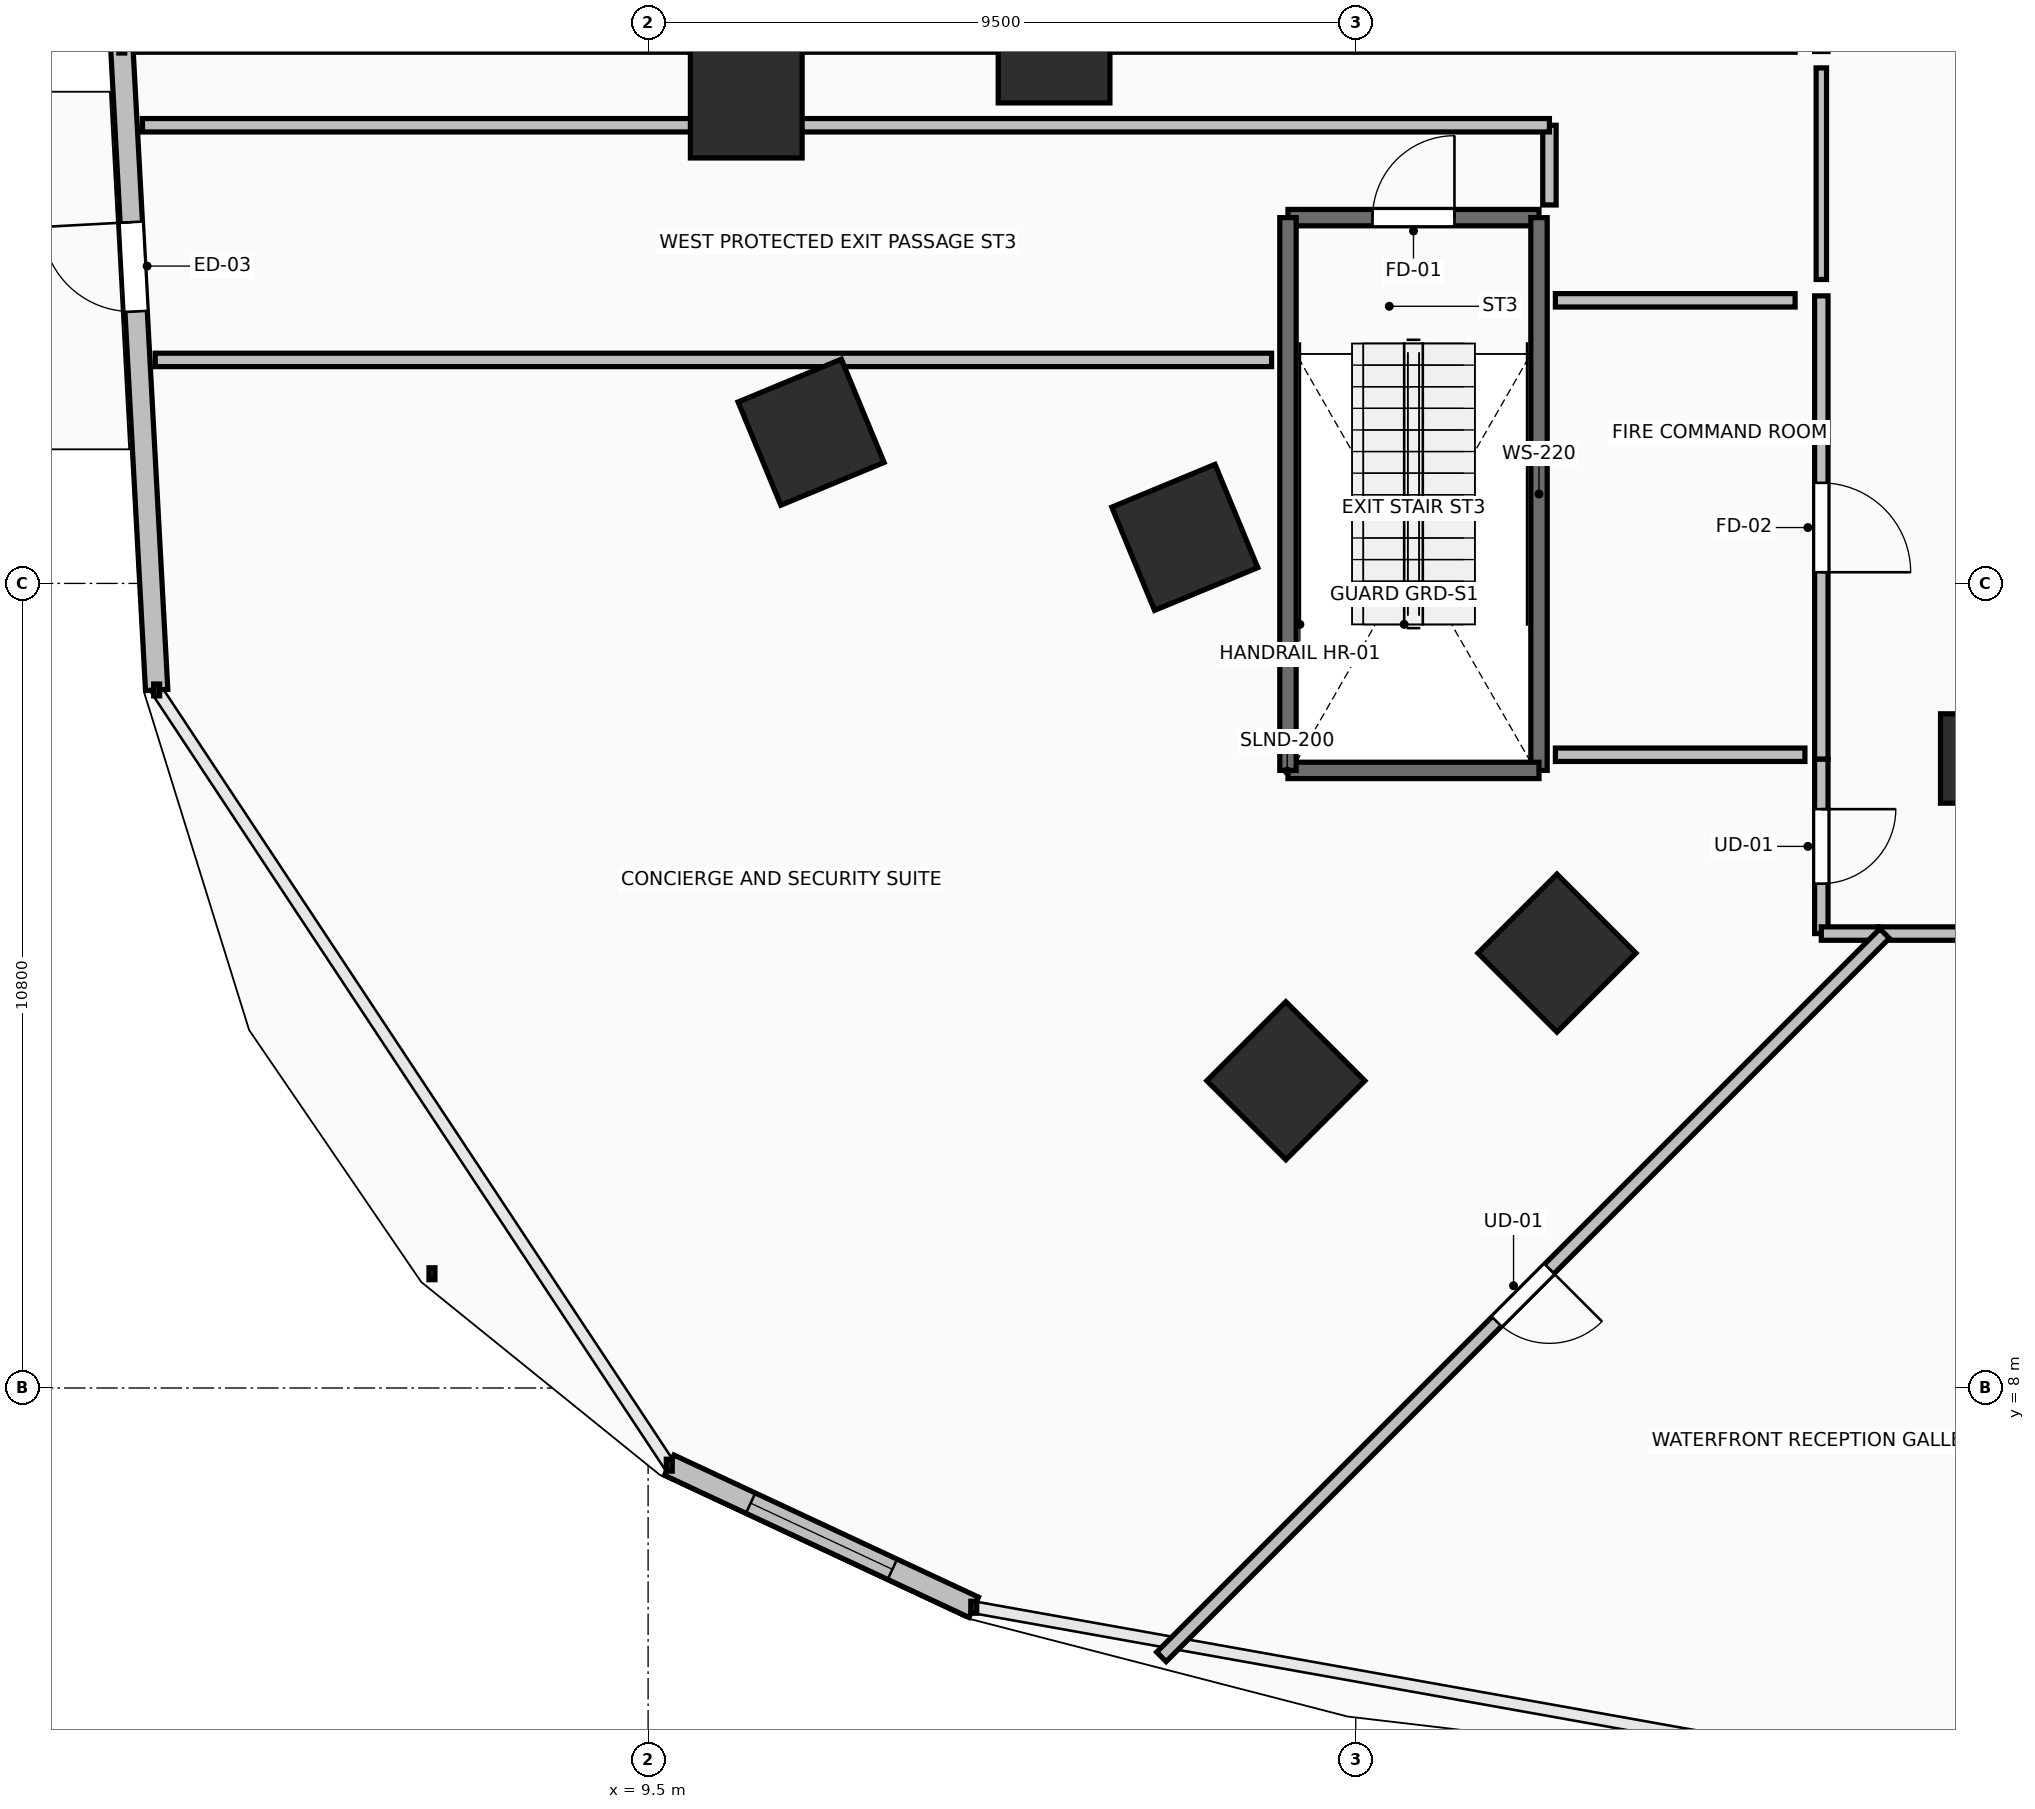
"""IFC4 building model, lengths in metres.
Left out: names, types, materials, properties, quantities, classifications, styles, units other than length and angle.
Written with IfcOpenShell. Run it as: python <this file> out.ifc"""

import sys

from ifc_helpers import new_model, si_unit, direction, frame, frame_2d, origin, origin_2d, place, context, subcontext, project, spatial, rectangle, extrude, element, fill, save


model = new_model("IFC4")
c1 = context("Model", 3, precision=1e-05, world=origin(), true_north=direction((0.0, 1.0)))
c2 = subcontext(c1, "Body", "Model", "MODEL_VIEW")
j1 = project(units=[si_unit("LENGTHUNIT", "METRE"), si_unit("PLANEANGLEUNIT", "RADIAN")], contexts=[c1])
p1 = place(None, origin())
s1 = spatial("IfcSite", under=j1, at=p1, CompositionType="ELEMENT")
p2 = place(p1, origin())
s2 = spatial("IfcBuilding", under=s1, at=p2, CompositionType="ELEMENT")
p3 = place(p2, origin())
s3 = spatial("IfcBuildingStorey", under=s2, at=p3, CompositionType="ELEMENT", Elevation=0.0)
for number, where, z_axis, x_axis in (
    (1, (14.95, 26.0, 0.0), (0.0, 0.0, 1.0), (-1.0, 0.0, 0.0)),
    (2, (16.705, 19.418, 0.0), (0.0, 0.0, 1.0), (-0.924, -0.383, 0.0)),
    (3, (21.701, 13.838, 0.0), (0.0, 0.0, 1.0), (-0.707, -0.707, 0.0)),
    (4, (10.818, 25.261, 0.0), (0.0, 0.0, 1.0), (-1.0, 0.0, 0.0)),
    (5, (11.688, 20.83, 0.0), (0.0, 0.0, 1.0), (-0.924, -0.383, 0.0)),
    (6, (18.061, 12.124, 0.0), (0.0, 0.0, 1.0), (-0.707, -0.707, 0.0)),
):
    element("IfcColumn", number, at=place(p3, frame(where, z_axis=z_axis, x_axis=x_axis)), inside=s3, PredefinedType="COLUMN", context=c2, shape_type="SweptSolid", body=[
        extrude(rectangle(XDim=1.5, YDim=1.5, at=origin_2d()), origin(), (0.0, 0.0, 1.0), 4.8),
    ])
p4 = place(p3, frame((27.25, 16.45, 0.0), z_axis=(0.0, 0.0, 1.0), x_axis=(1.0, 0.0, 0.0)))
e7 = element("IfcColumn", 7, at=p4, inside=s3, PredefinedType="PILASTER", context=c2, shape_type="SweptSolid", body=[
    extrude(rectangle(XDim=0.8, YDim=1.2, at=origin_2d()), origin(), (0.0, 0.0, 1.0), 4.8),
])
p5 = place(p3, frame((2.434, 26.0, 0.0), z_axis=(0.0, 0.0, 1.0), x_axis=(0.054179266439, -0.998531224894, 0.0)))
e8 = element("IfcWall", 8, at=p5, inside=s3, PredefinedType="STANDARD", context=c2, shape_type="SweptSolid", body=[
    extrude(rectangle(XDim=8.643, YDim=0.3, at=frame_2d((4.321, 0.0))), origin(), (0.0, 0.0, 1.0), 4.48),
])
p6 = place(p5, frame((2.354, 0.0, 0.0)))
e9 = element("IfcOpeningElement", 9, at=p6, cuts=e8, PredefinedType="OPENING", context=c2, shape_type="SweptSolid", body=[
    extrude(rectangle(XDim=1.2, YDim=2.15, at=frame_2d((0.6, 1.075))), frame((0.0, 0.165, 0.0), z_axis=(0.0, -1.0, 0.0), x_axis=(1.0, 0.0, 0.0)), (0.0, 0.0, 1.0), 0.33),
])
p7 = place(p3, frame((9.784, 6.964, 0.0), z_axis=(0.0, 0.0, 1.0), x_axis=(0.90617069541, -0.422912131275, 0.0)))
e10 = element("IfcWall", 10, at=p7, inside=s3, PredefinedType="STANDARD", context=c2, shape_type="SweptSolid", body=[
    extrude(rectangle(XDim=4.511, YDim=0.3, at=frame_2d((2.255, 0.0))), origin(), (0.0, 0.0, 1.0), 4.48),
])
p8 = place(p7, frame((1.205, 0.0, 0.9)))
e11 = element("IfcOpeningElement", 11, at=p8, cuts=e10, PredefinedType="OPENING", context=c2, shape_type="SweptSolid", body=[
    extrude(rectangle(XDim=2.1, YDim=2.4, at=frame_2d((1.05, 1.2))), frame((0.0, 0.165, 0.0), z_axis=(0.0, -1.0, 0.0), x_axis=(1.0, 0.0, 0.0)), (0.0, 0.0, 1.0), 0.33),
])
p9 = place(p3, frame((18.09, 23.71, 0.0), z_axis=(0.0, 0.0, 1.0), x_axis=(1.0, 0.0, 0.0)))
e12 = element("IfcWall", 12, at=p9, inside=s3, PredefinedType="SOLIDWALL", context=c2, shape_type="SweptSolid", body=[
    extrude(rectangle(XDim=3.37, YDim=0.22, at=frame_2d((1.685, 0.0))), origin(), (0.0, 0.0, 1.0), 4.48),
])
p10 = place(p9, frame((1.135, 0.0, 0.0)))
e13 = element("IfcOpeningElement", 13, at=p10, cuts=e12, PredefinedType="OPENING", context=c2, shape_type="SweptSolid", body=[
    extrude(rectangle(XDim=1.1, YDim=2.15, at=frame_2d((0.55, 1.075))), frame((0.0, 0.125, 0.0), z_axis=(0.0, -1.0, 0.0), x_axis=(1.0, 0.0, 0.0)), (0.0, 0.0, 1.0), 0.25),
])
p11 = place(p3, frame((21.46, 23.71, 0.0), z_axis=(0.0, 0.0, 1.0), x_axis=(0.0, -1.0, 0.0)))
e14 = element("IfcWall", 14, at=p11, inside=s3, PredefinedType="SOLIDWALL", context=c2, shape_type="SweptSolid", body=[
    extrude(rectangle(XDim=7.42, YDim=0.22, at=frame_2d((3.71, 0.0))), origin(), (0.0, 0.0, 1.0), 4.48),
])
p12 = place(p3, frame((21.46, 16.29, 0.0), z_axis=(0.0, 0.0, 1.0), x_axis=(-1.0, 0.0, 0.0)))
e15 = element("IfcWall", 15, at=p12, inside=s3, PredefinedType="SOLIDWALL", context=c2, shape_type="SweptSolid", body=[
    extrude(rectangle(XDim=3.37, YDim=0.22, at=frame_2d((1.685, 0.0))), origin(), (0.0, 0.0, 1.0), 4.48),
])
p13 = place(p3, frame((18.09, 16.29, 0.0), z_axis=(0.0, 0.0, 1.0), x_axis=(0.0, 1.0, 0.0)))
e16 = element("IfcWall", 16, at=p13, inside=s3, PredefinedType="SOLIDWALL", context=c2, shape_type="SweptSolid", body=[
    extrude(rectangle(XDim=7.42, YDim=0.22, at=frame_2d((3.71, 0.0))), origin(), (0.0, 0.0, 1.0), 4.48),
])
p14 = place(p3, frame((25.25, 22.66, 0.0), z_axis=(0.0, 0.0, 1.0), x_axis=(0.0, -1.0, 0.0)))
e17 = element("IfcWall", 17, at=p14, inside=s3, PredefinedType="PARTITIONING", context=c2, shape_type="SweptSolid", body=[
    extrude(rectangle(XDim=6.22, YDim=0.18, at=frame_2d((3.11, 0.0))), origin(), (0.0, 0.0, 1.0), 4.48),
])
p15 = place(p14, frame((2.51, 0.0, 0.0)))
e18 = element("IfcOpeningElement", 18, at=p15, cuts=e17, PredefinedType="OPENING", context=c2, shape_type="SweptSolid", body=[
    extrude(rectangle(XDim=1.2, YDim=2.15, at=frame_2d((0.6, 1.075))), frame((0.0, 0.105, 0.0), z_axis=(0.0, -1.0, 0.0), x_axis=(1.0, 0.0, 0.0)), (0.0, 0.0, 1.0), 0.21),
])
p16 = place(p3, frame((26.015, 14.1, 0.0), z_axis=(0.0, 0.0, 1.0), x_axis=(1.0, 0.0, 0.0)))
e19 = element("IfcWall", 19, at=p16, inside=s3, PredefinedType="PARTITIONING", context=c2, shape_type="SweptSolid", body=[
    extrude(rectangle(XDim=7.116, YDim=0.18, at=frame_2d((3.558, 0.0))), origin(), (0.0, 0.0, 1.0), 3.672),
])
p17 = place(p16, frame((2.958, 0.0, 0.0)))
e20 = element("IfcOpeningElement", 20, at=p17, cuts=e19, PredefinedType="OPENING", context=c2, shape_type="SweptSolid", body=[
    extrude(rectangle(XDim=1.2, YDim=2.15, at=frame_2d((0.6, 1.075))), frame((0.0, 0.105, 0.0), z_axis=(0.0, -1.0, 0.0), x_axis=(1.0, 0.0, 0.0)), (0.0, 0.0, 1.0), 0.21),
])
p18 = place(p3, frame((25.25, 16.44, 0.0), z_axis=(0.0, 0.0, 1.0), x_axis=(0.0, -1.0, 0.0)))
e21 = element("IfcWall", 21, at=p18, inside=s3, PredefinedType="PARTITIONING", context=c2, shape_type="SweptSolid", body=[
    extrude(rectangle(XDim=2.34, YDim=0.18, at=frame_2d((1.17, 0.0))), origin(), (0.0, 0.0, 1.0), 3.672),
])
p19 = place(p18, frame((0.67, 0.0, 0.0)))
e22 = element("IfcOpeningElement", 22, at=p19, cuts=e21, PredefinedType="OPENING", context=c2, shape_type="SweptSolid", body=[
    extrude(rectangle(XDim=1.0, YDim=2.15, at=frame_2d((0.5, 1.075))), frame((0.0, 0.105, 0.0), z_axis=(0.0, -1.0, 0.0), x_axis=(1.0, 0.0, 0.0)), (0.0, 0.0, 1.0), 0.21),
])
p20 = place(p3, frame((25.25, 14.1, 0.0), z_axis=(0.0, 0.0, 1.0), x_axis=(1.0, 0.0, 0.0)))
e23 = element("IfcWall", 23, at=p20, inside=s3, PredefinedType="PARTITIONING", context=c2, shape_type="SweptSolid", body=[
    extrude(rectangle(XDim=0.765, YDim=0.18, at=frame_2d((0.382, 0.0))), origin(), (0.0, 0.0, 1.0), 4.212),
])
p21 = place(p3, frame((26.1, 14.1, 0.0), z_axis=(0.0, 0.0, 1.0), x_axis=(-0.707106781187, -0.707106781187, 0.0)))
e24 = element("IfcWall", 24, at=p21, inside=s3, PredefinedType="PARTITIONING", context=c2, shape_type="SweptSolid", body=[
    extrude(rectangle(XDim=13.73, YDim=0.18, at=frame_2d((6.865, 0.0))), origin(), (0.0, 0.0, 1.0), 3.769),
])
p22 = place(p21, frame((6.365, 0.0, 0.0)))
e25 = element("IfcOpeningElement", 25, at=p22, cuts=e24, PredefinedType="OPENING", context=c2, shape_type="SweptSolid", body=[
    extrude(rectangle(XDim=1.0, YDim=2.15, at=frame_2d((0.5, 1.075))), frame((0.0, 0.105, 0.0), z_axis=(0.0, -1.0, 0.0), x_axis=(1.0, 0.0, 0.0)), (0.0, 0.0, 1.0), 0.21),
])
p23 = place(p3, frame((25.25, 25.72, 0.0), z_axis=(0.0, 0.0, 1.0), x_axis=(0.0, -1.0, 0.0)))
e26 = element("IfcWall", 26, at=p23, inside=s3, PredefinedType="PARTITIONING", context=c2, shape_type="SweptSolid", body=[
    extrude(rectangle(XDim=2.84, YDim=0.14, at=frame_2d((1.42, 0.0))), origin(), (0.0, 0.0, 1.0), 4.48),
])
p24 = place(p3, frame((21.6, 23.88, 0.0), z_axis=(0.0, 0.0, 1.0), x_axis=(0.0, 1.0, 0.0)))
e27 = element("IfcWall", 27, at=p24, inside=s3, PredefinedType="PARTITIONING", context=c2, shape_type="SweptSolid", body=[
    extrude(rectangle(XDim=1.07, YDim=0.18, at=frame_2d((0.535, 0.0))), origin(), (0.0, 0.0, 1.0), 4.48),
])
p25 = place(p3, frame((21.6, 24.95, 0.0), z_axis=(0.0, 0.0, 1.0), x_axis=(-1.0, 0.0, 0.0)))
e28 = element("IfcWall", 28, at=p25, inside=s3, PredefinedType="PARTITIONING", context=c2, shape_type="SweptSolid", body=[
    extrude(rectangle(XDim=18.888, YDim=0.18, at=frame_2d((9.444, 0.0))), origin(), (0.0, 0.0, 1.0), 4.162),
])
p26 = place(p3, frame((2.883, 21.8, 0.0), z_axis=(0.0, 0.0, 1.0), x_axis=(1.0, 0.0, 0.0)))
e29 = element("IfcWall", 29, at=p26, inside=s3, PredefinedType="PARTITIONING", context=c2, shape_type="SweptSolid", body=[
    extrude(rectangle(XDim=14.987, YDim=0.18, at=frame_2d((7.494, 0.0))), origin(), (0.0, 0.0, 1.0), 3.769),
])
p27 = place(p3, frame((21.68, 16.5, 0.0), z_axis=(0.0, 0.0, 1.0), x_axis=(1.0, 0.0, 0.0)))
e30 = element("IfcWall", 30, at=p27, inside=s3, PredefinedType="PARTITIONING", context=c2, shape_type="SweptSolid", body=[
    extrude(rectangle(XDim=3.35, YDim=0.18, at=frame_2d((1.675, 0.0))), origin(), (0.0, 0.0, 1.0), 4.48),
])
p28 = place(p3, frame((24.898, 22.6, 0.0), z_axis=(0.0, 0.0, 1.0), x_axis=(-1.0, 0.0, 0.0)))
e31 = element("IfcWall", 31, at=p28, inside=s3, PredefinedType="PARTITIONING", context=c2, shape_type="SweptSolid", body=[
    extrude(rectangle(XDim=3.218, YDim=0.18, at=frame_2d((1.609, 0.0))), origin(), (0.0, 0.0, 1.0), 4.48),
])
p29 = place(p6, frame((1.2, 0.0, 0.0), z_axis=(0.0, 0.0, 1.0), x_axis=(-1.0, 0.0, 0.0)))
e32 = element("IfcDoor", 32, at=p29, inside=s3, OperationType="SINGLE_SWING_LEFT", PredefinedType="DOOR", context=c2, shape_type="SweptSolid", body=[
    extrude(rectangle(XDim=1.2, YDim=2.15, at=frame_2d((0.6, 1.075))), frame((0.0, 0.025, 0.0), z_axis=(0.0, -1.0, 0.0), x_axis=(1.0, 0.0, 0.0)), (0.0, 0.0, 1.0), 0.05),
])
fill(e9, e32)
p30 = place(p8, origin())
e33 = element("IfcWindow", 33, at=p30, inside=s3, PartitioningType="SINGLE_PANEL", PredefinedType="WINDOW", context=c2, shape_type="SweptSolid", body=[
    extrude(rectangle(XDim=2.1, YDim=2.4, at=frame_2d((1.05, 1.2))), frame((0.0, 0.03, 0.0), z_axis=(0.0, -1.0, 0.0), x_axis=(1.0, 0.0, 0.0)), (0.0, 0.0, 1.0), 0.06),
])
fill(e11, e33)
p31 = place(p10, origin())
e34 = element("IfcDoor", 34, at=p31, inside=s3, OperationType="SINGLE_SWING_RIGHT", PredefinedType="DOOR", context=c2, shape_type="SweptSolid", body=[
    extrude(rectangle(XDim=1.1, YDim=2.15, at=frame_2d((0.55, 1.075))), frame((0.0, 0.025, 0.0), z_axis=(0.0, -1.0, 0.0), x_axis=(1.0, 0.0, 0.0)), (0.0, 0.0, 1.0), 0.05),
])
fill(e13, e34)
p32 = place(p15, origin())
e35 = element("IfcDoor", 35, at=p32, inside=s3, OperationType="SINGLE_SWING_RIGHT", PredefinedType="DOOR", context=c2, shape_type="SweptSolid", body=[
    extrude(rectangle(XDim=1.2, YDim=2.15, at=frame_2d((0.6, 1.075))), frame((0.0, 0.025, 0.0), z_axis=(0.0, -1.0, 0.0), x_axis=(1.0, 0.0, 0.0)), (0.0, 0.0, 1.0), 0.05),
])
fill(e18, e35)
p33 = place(p19, origin())
e36 = element("IfcDoor", 36, at=p33, inside=s3, OperationType="SINGLE_SWING_LEFT", PredefinedType="DOOR", context=c2, shape_type="SweptSolid", body=[
    extrude(rectangle(XDim=1.0, YDim=2.15, at=frame_2d((0.5, 1.075))), frame((0.0, 0.025, 0.0), z_axis=(0.0, -1.0, 0.0), x_axis=(1.0, 0.0, 0.0)), (0.0, 0.0, 1.0), 0.05),
])
fill(e22, e36)
p34 = place(p22, origin())
e37 = element("IfcDoor", 37, at=p34, inside=s3, OperationType="SINGLE_SWING_LEFT", PredefinedType="DOOR", context=c2, shape_type="SweptSolid", body=[
    extrude(rectangle(XDim=1.0, YDim=2.15, at=frame_2d((0.5, 1.075))), frame((0.0, 0.025, 0.0), z_axis=(0.0, -1.0, 0.0), x_axis=(1.0, 0.0, 0.0)), (0.0, 0.0, 1.0), 0.05),
])
fill(e25, e37)
save(model, sys.argv[1])
